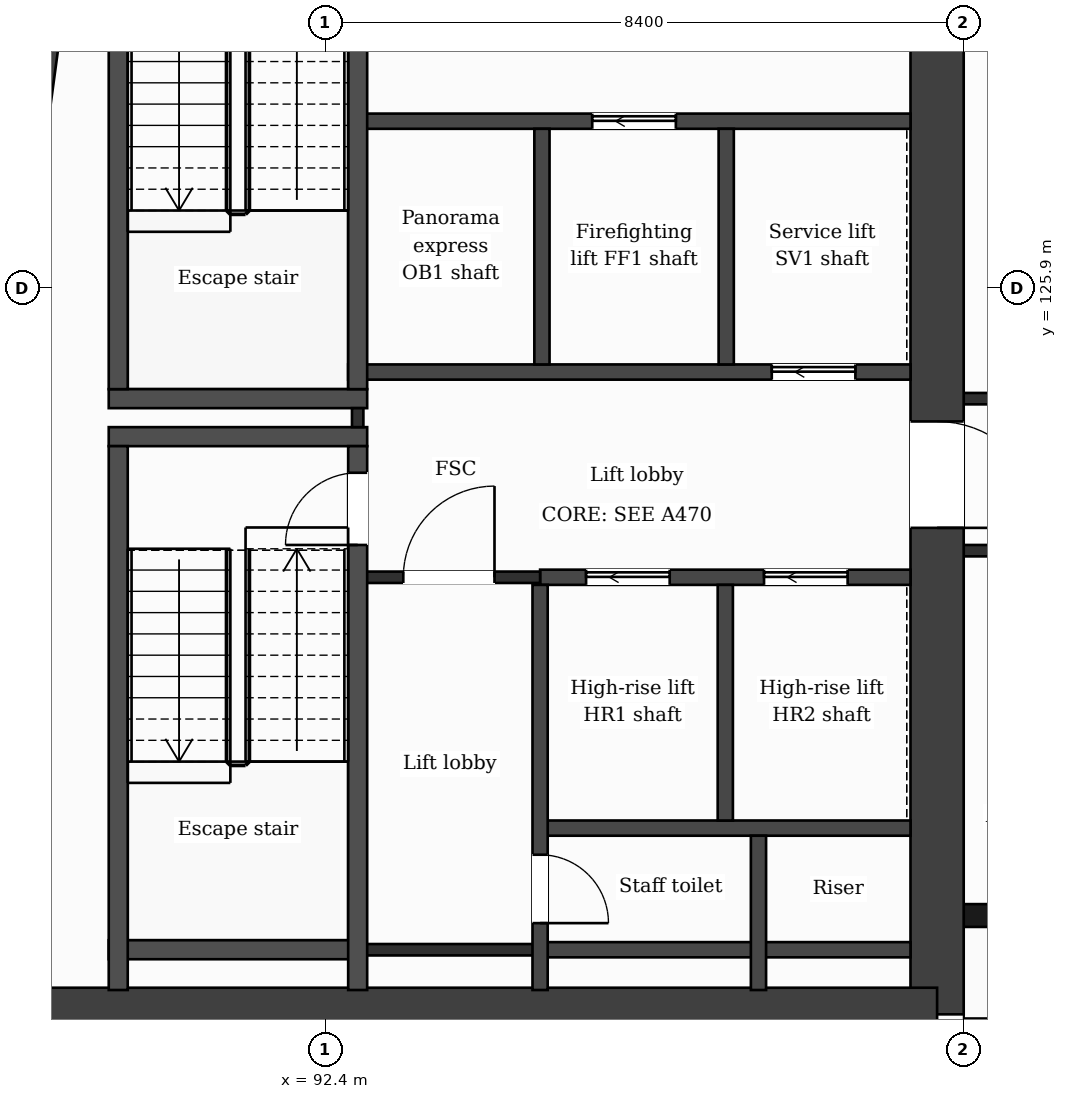
"""IFC4 building model, lengths in metres.
Left out: names, types, materials, properties, quantities, classifications, styles, units other than length and angle.
Written with IfcOpenShell. Run it as: python <this file> out.ifc"""

import sys

from ifc_helpers import new_model, si_unit, direction, frame, frame_2d, origin, place, context, subcontext, project, spatial, rectangle, extrude, element, fill, save


model = new_model("IFC4")
c1 = context("Model", 3, precision=1e-05, world=origin(), true_north=direction((0.0, 1.0)))
c2 = subcontext(c1, "Body", "Model", "MODEL_VIEW")
j1 = project(units=[si_unit("LENGTHUNIT", "METRE"), si_unit("PLANEANGLEUNIT", "RADIAN")], contexts=[c1])
p1 = place(None, origin())
s1 = spatial("IfcSite", under=j1, at=p1, CompositionType="ELEMENT")
p2 = place(p1, origin())
s2 = spatial("IfcBuilding", under=s1, at=p2, CompositionType="ELEMENT")
p3 = place(p2, frame((0.0, 0.0, 284.9)))
s3 = spatial("IfcBuildingStorey", under=s2, at=p3, CompositionType="ELEMENT", Elevation=284.9)
p4 = place(p3, frame((100.45, 132.05, 0.0), z_axis=(0.0, 0.0, 1.0), x_axis=(0.0, -1.0, 0.0)))
e1 = element("IfcWall", 1, at=p4, inside=s3, PredefinedType="SHEAR", context=c2, shape_type="SweptSolid", body=[
    extrude(rectangle(XDim=15.7, YDim=0.7, at=frame_2d((7.85, 0.0))), origin(), (0.0, 0.0, 1.0), 3.7),
])
p5 = place(p4, frame((7.9, 0.0, 0.0)))
e2 = element("IfcOpeningElement", 2, at=p5, cuts=e1, PredefinedType="OPENING", context=c2, shape_type="SweptSolid", body=[
    extrude(rectangle(XDim=1.4, YDim=2.1, at=frame_2d((0.7, 1.05))), frame((0.0, 0.36, 0.0), z_axis=(0.0, -1.0, 0.0), x_axis=(1.0, 0.0, 0.0)), (0.0, 0.0, 1.0), 0.72),
])
p6 = place(p3, frame((100.45, 116.35, 0.0), z_axis=(0.0, 0.0, 1.0), x_axis=(-1.0, 0.0, 0.0)))
e3 = element("IfcWall", 3, at=p6, inside=s3, PredefinedType="SHEAR", context=c2, shape_type="SweptSolid", body=[
    extrude(rectangle(XDim=13.627, YDim=0.7, at=frame_2d((6.813, 0.0))), origin(), (0.0, 0.0, 1.0), 3.7),
])
p7 = place(p3, frame((86.823, 116.35, 0.0), z_axis=(0.0, 0.0, 1.0), x_axis=(0.133416378607, 0.99106007382, 0.0)))
e4 = element("IfcWall", 4, at=p7, inside=s3, PredefinedType="SHEAR", context=c2, shape_type="SweptSolid", body=[
    extrude(rectangle(XDim=15.842, YDim=0.7, at=frame_2d((7.921, 0.0))), origin(), (0.0, 0.0, 1.0), 3.7),
])
p8 = place(p3, frame((100.8, 117.65, 0.0), z_axis=(0.0, 0.0, 1.0), x_axis=(1.0, 0.0, 0.0)))
e5 = element("IfcWall", 5, at=p8, inside=s3, PredefinedType="SOLIDWALL", context=c2, shape_type="SweptSolid", body=[
    extrude(rectangle(XDim=25.2, YDim=0.3, at=frame_2d((12.6, 0.0))), origin(), (0.0, 0.0, 1.0), 3.38),
])
p9 = place(p8, frame((0.95, 0.0, 0.9)))
e6 = element("IfcOpeningElement", 6, at=p9, cuts=e5, PredefinedType="OPENING", context=c2, shape_type="SweptSolid", body=[
    extrude(rectangle(XDim=2.4, YDim=2.1, at=frame_2d((1.2, 1.05))), frame((0.0, 0.16, 0.0), z_axis=(0.0, -1.0, 0.0), x_axis=(1.0, 0.0, 0.0)), (0.0, 0.0, 1.0), 0.32),
])
p10 = place(p8, frame((5.1, 0.0, 0.9)))
e7 = element("IfcOpeningElement", 7, at=p10, cuts=e5, PredefinedType="OPENING", context=c2, shape_type="SweptSolid", body=[
    extrude(rectangle(XDim=2.4, YDim=2.1, at=frame_2d((1.2, 1.05))), frame((0.0, 0.16, 0.0), z_axis=(0.0, -1.0, 0.0), x_axis=(1.0, 0.0, 0.0)), (0.0, 0.0, 1.0), 0.32),
])
p11 = place(p8, frame((9.3, 0.0, 0.9)))
e8 = element("IfcOpeningElement", 8, at=p11, cuts=e5, PredefinedType="OPENING", context=c2, shape_type="SweptSolid", body=[
    extrude(rectangle(XDim=2.4, YDim=2.1, at=frame_2d((1.2, 1.05))), frame((0.0, 0.16, 0.0), z_axis=(0.0, -1.0, 0.0), x_axis=(1.0, 0.0, 0.0)), (0.0, 0.0, 1.0), 0.32),
])
p12 = place(p8, frame((14.1, 0.0, 0.9)))
e9 = element("IfcOpeningElement", 9, at=p12, cuts=e5, PredefinedType="OPENING", context=c2, shape_type="SweptSolid", body=[
    extrude(rectangle(XDim=1.2, YDim=2.1, at=frame_2d((0.6, 1.05))), frame((0.0, 0.16, 0.0), z_axis=(0.0, -1.0, 0.0), x_axis=(1.0, 0.0, 0.0)), (0.0, 0.0, 1.0), 0.32),
])
p13 = place(p8, frame((18.3, 0.0, 0.9)))
e10 = element("IfcOpeningElement", 10, at=p13, cuts=e5, PredefinedType="OPENING", context=c2, shape_type="SweptSolid", body=[
    extrude(rectangle(XDim=1.2, YDim=2.1, at=frame_2d((0.6, 1.05))), frame((0.0, 0.16, 0.0), z_axis=(0.0, -1.0, 0.0), x_axis=(1.0, 0.0, 0.0)), (0.0, 0.0, 1.0), 0.32),
])
p14 = place(p8, frame((21.75, 0.0, 0.0)))
e11 = element("IfcOpeningElement", 11, at=p14, cuts=e5, PredefinedType="OPENING", context=c2, shape_type="SweptSolid", body=[
    extrude(rectangle(XDim=1.2, YDim=2.4, at=frame_2d((0.6, 1.2))), frame((0.0, 0.16, 0.0), z_axis=(0.0, -1.0, 0.0), x_axis=(1.0, 0.0, 0.0)), (0.0, 0.0, 1.0), 0.32),
])
p15 = place(p8, frame((23.55, 0.0, 0.9)))
e12 = element("IfcOpeningElement", 12, at=p15, cuts=e5, PredefinedType="OPENING", context=c2, shape_type="SweptSolid", body=[
    extrude(rectangle(XDim=1.2, YDim=2.1, at=frame_2d((0.6, 1.05))), frame((0.0, 0.16, 0.0), z_axis=(0.0, -1.0, 0.0), x_axis=(1.0, 0.0, 0.0)), (0.0, 0.0, 1.0), 0.32),
])
p16 = place(p3, frame((95.227, 117.2, 0.0), z_axis=(0.0, 0.0, 1.0), x_axis=(1.0, 0.0, 0.0)))
e13 = element("IfcWall", 13, at=p16, inside=s3, PredefinedType="PARTITIONING", context=c2, shape_type="SweptSolid", body=[
    extrude(rectangle(XDim=4.873, YDim=0.2, at=frame_2d((2.437, 0.0))), origin(), (0.0, 0.0, 1.0), 3.38),
])
p17 = place(p3, frame((92.827, 117.2, 0.0), z_axis=(0.0, 0.0, 1.0), x_axis=(1.0, 0.0, 0.0)))
e14 = element("IfcWall", 14, at=p17, inside=s3, PredefinedType="PARTITIONING", context=c2, shape_type="SweptSolid", body=[
    extrude(rectangle(XDim=2.4, YDim=0.15, at=frame_2d((1.2, 0.0))), origin(), (0.0, 0.0, 1.0), 3.38),
])
p18 = place(p3, frame((89.552, 117.2, 0.0), z_axis=(0.0, 0.0, 1.0), x_axis=(1.0, 0.0, 0.0)))
e15 = element("IfcWall", 15, at=p18, inside=s3, PredefinedType="PARTITIONING", context=c2, shape_type="SweptSolid", body=[
    extrude(rectangle(XDim=3.275, YDim=0.25, at=frame_2d((1.637, 0.0))), origin(), (0.0, 0.0, 1.0), 3.38),
])
p19 = place(p3, frame((95.227, 118.8, 0.0), z_axis=(0.0, 0.0, 1.0), x_axis=(1.0, 0.0, 0.0)))
e16 = element("IfcWall", 16, at=p19, inside=s3, PredefinedType="PARTITIONING", context=c2, shape_type="SweptSolid", body=[
    extrude(rectangle(XDim=4.873, YDim=0.2, at=frame_2d((2.437, 0.0))), origin(), (0.0, 0.0, 1.0), 3.38),
])
p20 = place(p3, frame((95.227, 122.1, 0.0), z_axis=(0.0, 0.0, 1.0), x_axis=(1.0, 0.0, 0.0)))
e17 = element("IfcWall", 17, at=p20, inside=s3, PredefinedType="PARTITIONING", context=c2, shape_type="SweptSolid", body=[
    extrude(rectangle(XDim=4.873, YDim=0.2, at=frame_2d((2.437, 0.0))), origin(), (0.0, 0.0, 1.0), 3.38),
])
p21 = place(p20, frame((0.605, 0.0, 0.0)))
e18 = element("IfcOpeningElement", 18, at=p21, cuts=e17, PredefinedType="OPENING", context=c2, shape_type="SweptSolid", body=[
    extrude(rectangle(XDim=1.1, YDim=2.1, at=frame_2d((0.55, 1.05))), frame((0.0, 0.11, 0.0), z_axis=(0.0, -1.0, 0.0), x_axis=(1.0, 0.0, 0.0)), (0.0, 0.0, 1.0), 0.22),
])
p22 = place(p20, frame((2.946, 0.0, 0.0)))
e19 = element("IfcOpeningElement", 19, at=p22, cuts=e17, PredefinedType="OPENING", context=c2, shape_type="SweptSolid", body=[
    extrude(rectangle(XDim=1.1, YDim=2.1, at=frame_2d((0.55, 1.05))), frame((0.0, 0.11, 0.0), z_axis=(0.0, -1.0, 0.0), x_axis=(1.0, 0.0, 0.0)), (0.0, 0.0, 1.0), 0.22),
])
p23 = place(p3, frame((92.827, 122.1, 0.0), z_axis=(0.0, 0.0, 1.0), x_axis=(1.0, 0.0, 0.0)))
e20 = element("IfcWall", 20, at=p23, inside=s3, PredefinedType="PARTITIONING", context=c2, shape_type="SweptSolid", body=[
    extrude(rectangle(XDim=2.4, YDim=0.15, at=frame_2d((1.2, 0.0))), origin(), (0.0, 0.0, 1.0), 3.38),
])
p24 = place(p23, frame((0.6, 0.0, 0.0)))
e21 = element("IfcOpeningElement", 21, at=p24, cuts=e20, PredefinedType="OPENING", context=c2, shape_type="SweptSolid", body=[
    extrude(rectangle(XDim=1.2, YDim=2.1, at=frame_2d((0.6, 1.05))), frame((0.0, 0.085, 0.0), z_axis=(0.0, -1.0, 0.0), x_axis=(1.0, 0.0, 0.0)), (0.0, 0.0, 1.0), 0.17),
])
p25 = place(p3, frame((100.8, 122.45, 0.0), z_axis=(0.0, 0.0, 1.0), x_axis=(1.0, 0.0, 0.0)))
e22 = element("IfcWall", 22, at=p25, inside=s3, PredefinedType="PARTITIONING", context=c2, shape_type="SweptSolid", body=[
    extrude(rectangle(XDim=25.2, YDim=0.15, at=frame_2d((12.6, 0.0))), origin(), (0.0, 0.0, 1.0), 3.38),
])
p26 = place(p25, frame((0.55, 0.0, 0.0)))
e23 = element("IfcOpeningElement", 23, at=p26, cuts=e22, PredefinedType="OPENING", context=c2, shape_type="SweptSolid", body=[
    extrude(rectangle(XDim=1.0, YDim=2.1, at=frame_2d((0.5, 1.05))), frame((0.0, 0.085, 0.0), z_axis=(0.0, -1.0, 0.0), x_axis=(1.0, 0.0, 0.0)), (0.0, 0.0, 1.0), 0.17),
])
p27 = place(p25, frame((9.375, 0.0, 0.0)))
e24 = element("IfcOpeningElement", 24, at=p27, cuts=e22, PredefinedType="OPENING", context=c2, shape_type="SweptSolid", body=[
    extrude(rectangle(XDim=1.0, YDim=2.1, at=frame_2d((0.5, 1.05))), frame((0.0, 0.085, 0.0), z_axis=(0.0, -1.0, 0.0), x_axis=(1.0, 0.0, 0.0)), (0.0, 0.0, 1.0), 0.17),
])
p28 = place(p25, frame((13.23, 0.0, 0.0)))
e25 = element("IfcOpeningElement", 25, at=p28, cuts=e22, PredefinedType="OPENING", context=c2, shape_type="SweptSolid", body=[
    extrude(rectangle(XDim=1.0, YDim=2.1, at=frame_2d((0.5, 1.05))), frame((0.0, 0.085, 0.0), z_axis=(0.0, -1.0, 0.0), x_axis=(1.0, 0.0, 0.0)), (0.0, 0.0, 1.0), 0.17),
])
p29 = place(p25, frame((19.513, 0.0, 0.0)))
e26 = element("IfcOpeningElement", 26, at=p29, cuts=e22, PredefinedType="OPENING", context=c2, shape_type="SweptSolid", body=[
    extrude(rectangle(XDim=0.95, YDim=2.1, at=frame_2d((0.475, 1.05))), frame((0.0, 0.085, 0.0), z_axis=(0.0, -1.0, 0.0), x_axis=(1.0, 0.0, 0.0)), (0.0, 0.0, 1.0), 0.17),
])
p30 = place(p25, frame((21.7, 0.0, 0.0)))
e27 = element("IfcOpeningElement", 27, at=p30, cuts=e22, PredefinedType="OPENING", context=c2, shape_type="SweptSolid", body=[
    extrude(rectangle(XDim=1.0, YDim=2.1, at=frame_2d((0.5, 1.05))), frame((0.0, 0.085, 0.0), z_axis=(0.0, -1.0, 0.0), x_axis=(1.0, 0.0, 0.0)), (0.0, 0.0, 1.0), 0.17),
])
for number, where, z_axis, x_axis in (
    (28, (89.552, 123.95, 0.0), (0.0, 0.0, 1.0), (1.0, 0.0, 0.0)),
    (29, (89.552, 124.45, 0.0), (0.0, 0.0, 1.0), (1.0, 0.0, 0.0)),
):
    element("IfcWall", number, at=place(p3, frame(where, z_axis=z_axis, x_axis=x_axis)), inside=s3, PredefinedType="PARTITIONING", context=c2, shape_type="SweptSolid", body=[
        extrude(rectangle(XDim=3.4, YDim=0.25, at=frame_2d((1.7, 0.0))), origin(), (0.0, 0.0, 1.0), 3.38),
    ])
p31 = place(p3, frame((100.8, 124.45, 0.0), z_axis=(0.0, 0.0, 1.0), x_axis=(1.0, 0.0, 0.0)))
e30 = element("IfcWall", 30, at=p31, inside=s3, PredefinedType="PARTITIONING", context=c2, shape_type="SweptSolid", body=[
    extrude(rectangle(XDim=25.2, YDim=0.15, at=frame_2d((12.6, 0.0))), origin(), (0.0, 0.0, 1.0), 3.38),
])
p32 = place(p31, frame((21.075, 0.0, 0.0)))
e31 = element("IfcOpeningElement", 31, at=p32, cuts=e30, PredefinedType="OPENING", context=c2, shape_type="SweptSolid", body=[
    extrude(rectangle(XDim=1.0, YDim=2.1, at=frame_2d((0.5, 1.05))), frame((0.0, 0.085, 0.0), z_axis=(0.0, -1.0, 0.0), x_axis=(1.0, 0.0, 0.0)), (0.0, 0.0, 1.0), 0.17),
])
p33 = place(p31, frame((5.375, 0.0, 0.0)))
e32 = element("IfcOpeningElement", 32, at=p33, cuts=e30, PredefinedType="OPENING", context=c2, shape_type="SweptSolid", body=[
    extrude(rectangle(XDim=1.0, YDim=2.1, at=frame_2d((0.5, 1.05))), frame((0.0, 0.085, 0.0), z_axis=(0.0, -1.0, 0.0), x_axis=(1.0, 0.0, 0.0)), (0.0, 0.0, 1.0), 0.17),
])
p34 = place(p31, frame((12.1, 0.0, 0.0)))
e33 = element("IfcOpeningElement", 33, at=p34, cuts=e30, PredefinedType="OPENING", context=c2, shape_type="SweptSolid", body=[
    extrude(rectangle(XDim=1.0, YDim=2.1, at=frame_2d((0.5, 1.05))), frame((0.0, 0.085, 0.0), z_axis=(0.0, -1.0, 0.0), x_axis=(1.0, 0.0, 0.0)), (0.0, 0.0, 1.0), 0.17),
])
p35 = place(p31, frame((17.93, 0.0, 0.0)))
e34 = element("IfcOpeningElement", 34, at=p35, cuts=e30, PredefinedType="OPENING", context=c2, shape_type="SweptSolid", body=[
    extrude(rectangle(XDim=1.0, YDim=2.1, at=frame_2d((0.5, 1.05))), frame((0.0, 0.085, 0.0), z_axis=(0.0, -1.0, 0.0), x_axis=(1.0, 0.0, 0.0)), (0.0, 0.0, 1.0), 0.17),
])
p36 = place(p3, frame((92.702, 124.8, 0.0), z_axis=(0.0, 0.0, 1.0), x_axis=(1.0, 0.0, 0.0)))
e35 = element("IfcWall", 35, at=p36, inside=s3, PredefinedType="PARTITIONING", context=c2, shape_type="SweptSolid", body=[
    extrude(rectangle(XDim=7.398, YDim=0.2, at=frame_2d((3.699, 0.0))), origin(), (0.0, 0.0, 1.0), 3.38),
])
p37 = place(p36, frame((5.573, 0.0, 0.0)))
e36 = element("IfcOpeningElement", 36, at=p37, cuts=e35, PredefinedType="OPENING", context=c2, shape_type="SweptSolid", body=[
    extrude(rectangle(XDim=1.1, YDim=2.1, at=frame_2d((0.55, 1.05))), frame((0.0, 0.11, 0.0), z_axis=(0.0, -1.0, 0.0), x_axis=(1.0, 0.0, 0.0)), (0.0, 0.0, 1.0), 0.22),
])
p38 = place(p3, frame((92.827, 128.1, 0.0), z_axis=(0.0, 0.0, 1.0), x_axis=(1.0, 0.0, 0.0)))
e37 = element("IfcWall", 37, at=p38, inside=s3, PredefinedType="PARTITIONING", context=c2, shape_type="SweptSolid", body=[
    extrude(rectangle(XDim=7.273, YDim=0.2, at=frame_2d((3.637, 0.0))), origin(), (0.0, 0.0, 1.0), 3.38),
])
p39 = place(p38, frame((3.086, 0.0, 0.0)))
e38 = element("IfcOpeningElement", 38, at=p39, cuts=e37, PredefinedType="OPENING", context=c2, shape_type="SweptSolid", body=[
    extrude(rectangle(XDim=1.1, YDim=2.1, at=frame_2d((0.55, 1.05))), frame((0.0, 0.11, 0.0), z_axis=(0.0, -1.0, 0.0), x_axis=(1.0, 0.0, 0.0)), (0.0, 0.0, 1.0), 0.22),
])
for number, where, z_axis, x_axis in (
    (39, (89.677, 116.67, 0.0), (0.0, 0.0, 1.0), (0.0, 1.0, 0.0)),
    (40, (89.677, 124.575, 0.0), (0.0, 0.0, 1.0), (0.0, 1.0, 0.0)),
):
    element("IfcWall", number, at=place(p3, frame(where, z_axis=z_axis, x_axis=x_axis)), inside=s3, PredefinedType="PARTITIONING", context=c2, shape_type="SweptSolid", body=[
        extrude(rectangle(XDim=7.155, YDim=0.25, at=frame_2d((3.578, 0.0))), origin(), (0.0, 0.0, 1.0), 3.38),
    ])
p40 = place(p3, frame((92.827, 124.075, 0.0), z_axis=(0.0, 0.0, 1.0), x_axis=(0.0, 1.0, 0.0)))
e41 = element("IfcWall", 41, at=p40, inside=s3, PredefinedType="PARTITIONING", context=c2, shape_type="SweptSolid", body=[
    extrude(rectangle(XDim=0.25, YDim=0.15, at=frame_2d((0.125, 0.0))), origin(), (0.0, 0.0, 1.0), 3.38),
])
p41 = place(p3, frame((92.827, 116.67, 0.0), z_axis=(0.0, 0.0, 1.0), x_axis=(0.0, 1.0, 0.0)))
e42 = element("IfcWall", 42, at=p41, inside=s3, PredefinedType="PARTITIONING", context=c2, shape_type="SweptSolid", body=[
    extrude(rectangle(XDim=7.155, YDim=0.25, at=frame_2d((3.578, 0.0))), origin(), (0.0, 0.0, 1.0), 3.38),
])
p42 = place(p41, frame((5.855, 0.0, 0.0)))
e43 = element("IfcOpeningElement", 43, at=p42, cuts=e42, PredefinedType="OPENING", context=c2, shape_type="SweptSolid", body=[
    extrude(rectangle(XDim=0.95, YDim=2.1, at=frame_2d((0.475, 1.05))), frame((0.0, 0.135, 0.0), z_axis=(0.0, -1.0, 0.0), x_axis=(1.0, 0.0, 0.0)), (0.0, 0.0, 1.0), 0.27),
])
p43 = place(p3, frame((92.827, 124.575, 0.0), z_axis=(0.0, 0.0, 1.0), x_axis=(0.0, 1.0, 0.0)))
e44 = element("IfcWall", 44, at=p43, inside=s3, PredefinedType="PARTITIONING", context=c2, shape_type="SweptSolid", body=[
    extrude(rectangle(XDim=7.155, YDim=0.25, at=frame_2d((3.578, 0.0))), origin(), (0.0, 0.0, 1.0), 3.38),
])
p44 = place(p43, frame((5.325, 0.0, 0.0)))
e45 = element("IfcOpeningElement", 45, at=p44, cuts=e44, PredefinedType="OPENING", context=c2, shape_type="SweptSolid", body=[
    extrude(rectangle(XDim=1.0, YDim=2.1, at=frame_2d((0.5, 1.05))), frame((0.0, 0.135, 0.0), z_axis=(0.0, -1.0, 0.0), x_axis=(1.0, 0.0, 0.0)), (0.0, 0.0, 1.0), 0.27),
])
p45 = place(p3, frame((95.227, 116.67, 0.0), z_axis=(0.0, 0.0, 1.0), x_axis=(0.0, 1.0, 0.0)))
e46 = element("IfcWall", 46, at=p45, inside=s3, PredefinedType="PARTITIONING", context=c2, shape_type="SweptSolid", body=[
    extrude(rectangle(XDim=5.33, YDim=0.2, at=frame_2d((2.665, 0.0))), origin(), (0.0, 0.0, 1.0), 3.38),
])
p46 = place(p45, frame((0.88, 0.0, 0.0)))
e47 = element("IfcOpeningElement", 47, at=p46, cuts=e46, PredefinedType="OPENING", context=c2, shape_type="SweptSolid", body=[
    extrude(rectangle(XDim=0.9, YDim=2.1, at=frame_2d((0.45, 1.05))), frame((0.0, 0.11, 0.0), z_axis=(0.0, -1.0, 0.0), x_axis=(1.0, 0.0, 0.0)), (0.0, 0.0, 1.0), 0.22),
])
for number, where, z_axis, x_axis in (
    (48, (95.251, 124.9, 0.0), (0.0, 0.0, 1.0), (0.0, 1.0, 0.0)),
    (49, (97.664, 118.9, 0.0), (0.0, 0.0, 1.0), (0.0, 1.0, 0.0)),
    (50, (97.676, 124.9, 0.0), (0.0, 0.0, 1.0), (0.0, 1.0, 0.0)),
):
    element("IfcWall", number, at=place(p3, frame(where, z_axis=z_axis, x_axis=x_axis)), inside=s3, PredefinedType="PARTITIONING", context=c2, shape_type="SweptSolid", body=[
        extrude(rectangle(XDim=3.1, YDim=0.2, at=frame_2d((1.55, 0.0))), origin(), (0.0, 0.0, 1.0), 3.38),
    ])
p47 = place(p3, frame((98.1, 116.67, 0.0), z_axis=(0.0, 0.0, 1.0), x_axis=(0.0, 1.0, 0.0)))
e51 = element("IfcWall", 51, at=p47, inside=s3, PredefinedType="PARTITIONING", context=c2, shape_type="SweptSolid", body=[
    extrude(rectangle(XDim=2.03, YDim=0.2, at=frame_2d((1.015, 0.0))), origin(), (0.0, 0.0, 1.0), 3.38),
])
p48 = place(p24, origin())
e52 = element("IfcDoor", 52, at=p48, inside=s3, OperationType="SINGLE_SWING_RIGHT", PredefinedType="DOOR", context=c2, shape_type="SweptSolid", body=[
    extrude(rectangle(XDim=1.2, YDim=2.1, at=frame_2d((0.6, 1.05))), frame((0.0, 0.025, 0.0), z_axis=(0.0, -1.0, 0.0), x_axis=(1.0, 0.0, 0.0)), (0.0, 0.0, 1.0), 0.05),
])
fill(e21, e52)
p49 = place(p21, origin())
e53 = element("IfcDoor", 53, at=p49, inside=s3, OperationType="SLIDING_TO_LEFT", PredefinedType="DOOR", context=c2, shape_type="SweptSolid", body=[
    extrude(rectangle(XDim=1.1, YDim=2.1, at=frame_2d((0.55, 1.05))), frame((0.0, 0.025, 0.0), z_axis=(0.0, -1.0, 0.0), x_axis=(1.0, 0.0, 0.0)), (0.0, 0.0, 1.0), 0.05),
])
fill(e18, e53)
p50 = place(p22, origin())
e54 = element("IfcDoor", 54, at=p50, inside=s3, OperationType="SLIDING_TO_LEFT", PredefinedType="DOOR", context=c2, shape_type="SweptSolid", body=[
    extrude(rectangle(XDim=1.1, YDim=2.1, at=frame_2d((0.55, 1.05))), frame((0.0, 0.025, 0.0), z_axis=(0.0, -1.0, 0.0), x_axis=(1.0, 0.0, 0.0)), (0.0, 0.0, 1.0), 0.05),
])
fill(e19, e54)
p51 = place(p39, origin())
e55 = element("IfcDoor", 55, at=p51, inside=s3, OperationType="SLIDING_TO_LEFT", PredefinedType="DOOR", context=c2, shape_type="SweptSolid", body=[
    extrude(rectangle(XDim=1.1, YDim=2.1, at=frame_2d((0.55, 1.05))), frame((0.0, 0.025, 0.0), z_axis=(0.0, -1.0, 0.0), x_axis=(1.0, 0.0, 0.0)), (0.0, 0.0, 1.0), 0.05),
])
fill(e38, e55)
p52 = place(p37, origin())
e56 = element("IfcDoor", 56, at=p52, inside=s3, OperationType="SLIDING_TO_LEFT", PredefinedType="DOOR", context=c2, shape_type="SweptSolid", body=[
    extrude(rectangle(XDim=1.1, YDim=2.1, at=frame_2d((0.55, 1.05))), frame((0.0, 0.025, 0.0), z_axis=(0.0, -1.0, 0.0), x_axis=(1.0, 0.0, 0.0)), (0.0, 0.0, 1.0), 0.05),
])
fill(e36, e56)
p53 = place(p42, origin())
e57 = element("IfcDoor", 57, at=p53, inside=s3, OperationType="SINGLE_SWING_LEFT", PredefinedType="DOOR", context=c2, shape_type="SweptSolid", body=[
    extrude(rectangle(XDim=0.95, YDim=2.1, at=frame_2d((0.475, 1.05))), frame((0.0, 0.025, 0.0), z_axis=(0.0, -1.0, 0.0), x_axis=(1.0, 0.0, 0.0)), (0.0, 0.0, 1.0), 0.05),
])
fill(e43, e57)
p54 = place(p46, origin())
e58 = element("IfcDoor", 58, at=p54, inside=s3, OperationType="SINGLE_SWING_LEFT", PredefinedType="DOOR", context=c2, shape_type="SweptSolid", body=[
    extrude(rectangle(XDim=0.9, YDim=2.1, at=frame_2d((0.45, 1.05))), frame((0.0, 0.025, 0.0), z_axis=(0.0, -1.0, 0.0), x_axis=(1.0, 0.0, 0.0)), (0.0, 0.0, 1.0), 0.05),
])
fill(e47, e58)
p55 = place(p5, origin())
e59 = element("IfcDoor", 59, at=p55, inside=s3, OperationType="SINGLE_SWING_RIGHT", PredefinedType="DOOR", context=c2, shape_type="SweptSolid", body=[
    extrude(rectangle(XDim=1.4, YDim=2.1, at=frame_2d((0.7, 1.05))), frame((0.0, 0.025, 0.0), z_axis=(0.0, -1.0, 0.0), x_axis=(1.0, 0.0, 0.0)), (0.0, 0.0, 1.0), 0.05),
])
fill(e2, e59)
save(model, sys.argv[1])
